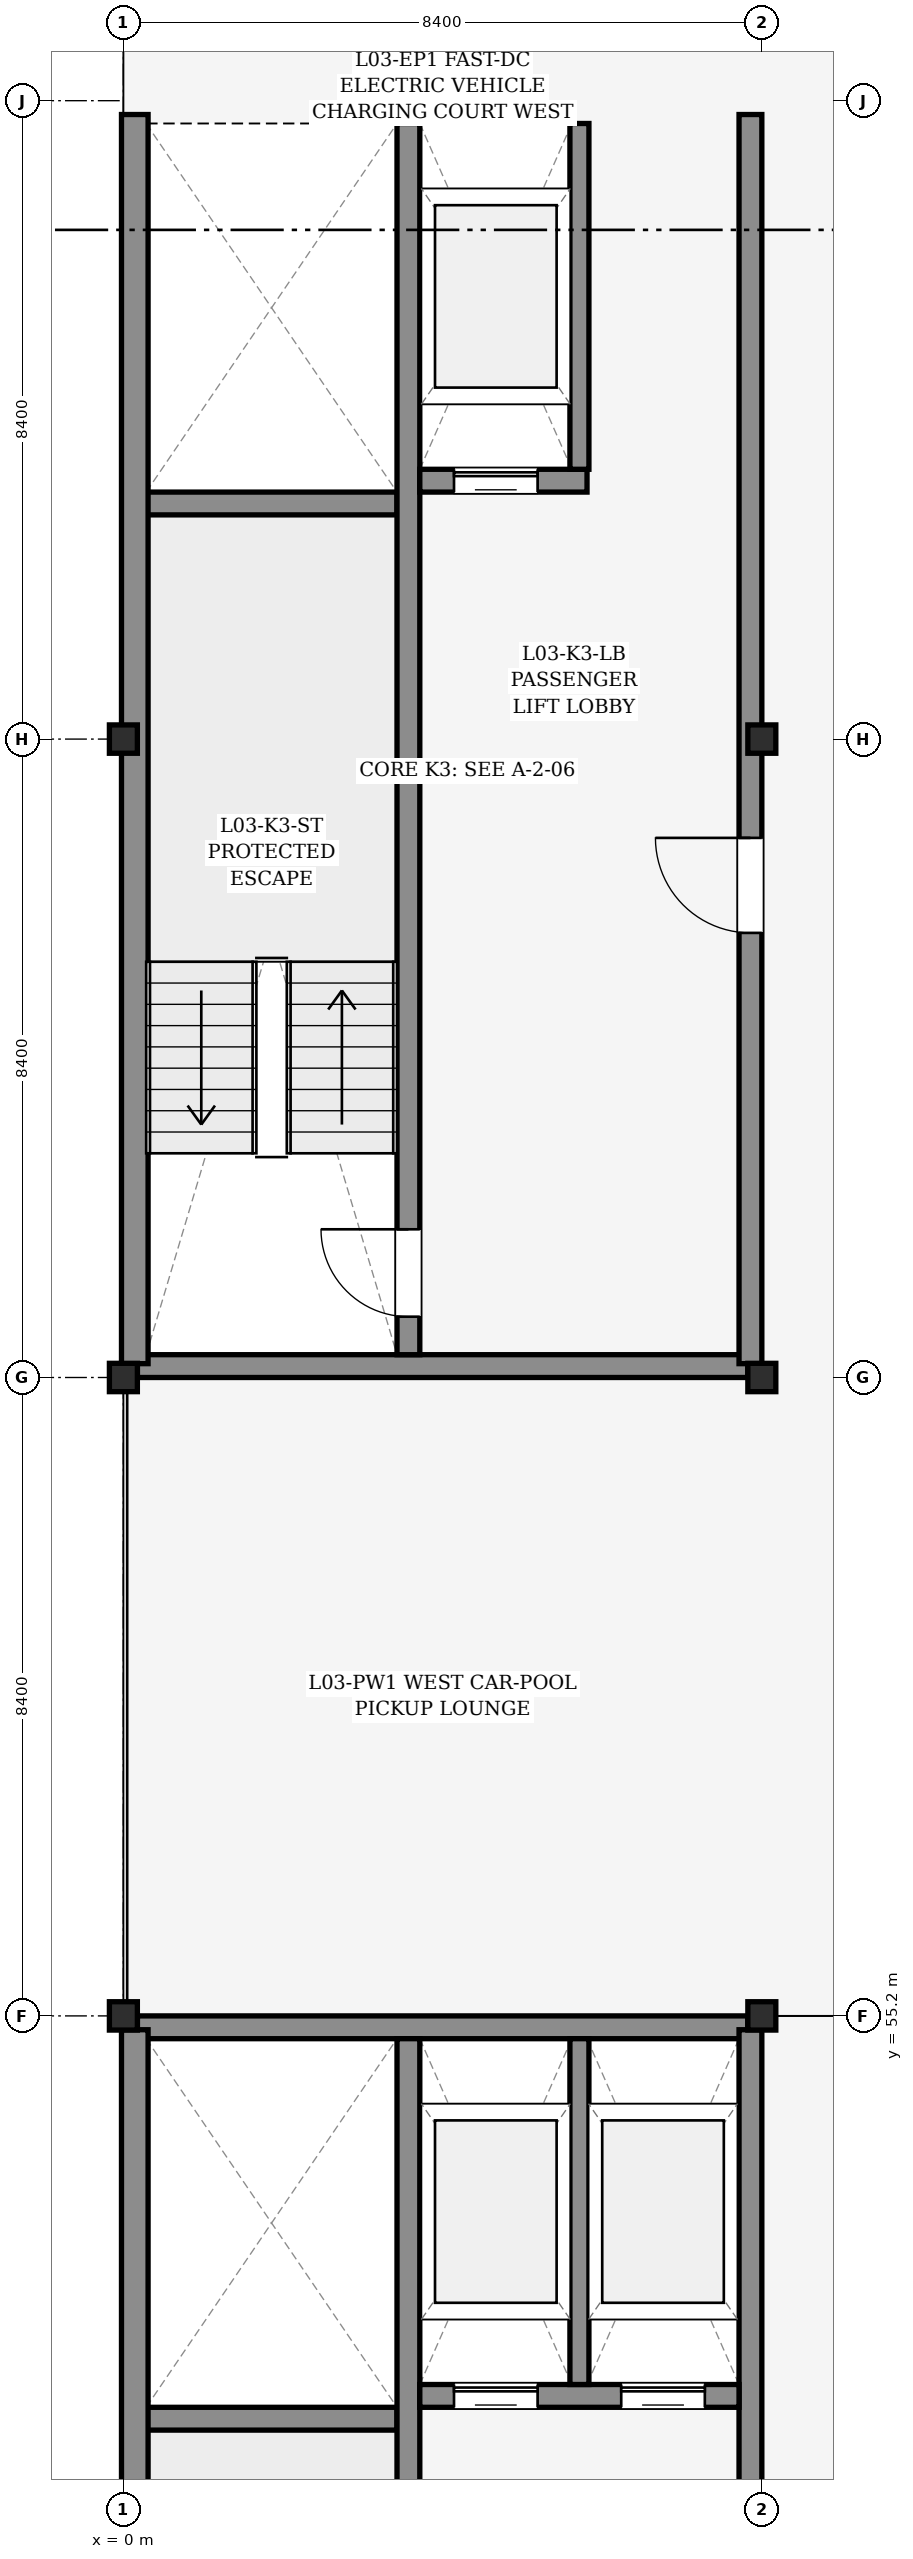
"""IFC4 building model, lengths in metres.
Left out: names, types, materials, properties, quantities, classifications, styles, units other than length and angle.
Written with IfcOpenShell. Run it as: python <this file> out.ifc"""

import sys

from ifc_helpers import new_model, si_unit, direction, frame, frame_2d, origin, origin_2d, place, context, subcontext, project, spatial, rectangle, i_section, extrude, element, fill, save


model = new_model("IFC4")
c1 = context("Model", 3, precision=1e-05, world=origin(), true_north=direction((0.0, 1.0)))
c2 = subcontext(c1, "Body", "Model", "MODEL_VIEW")
j1 = project(units=[si_unit("LENGTHUNIT", "METRE"), si_unit("PLANEANGLEUNIT", "RADIAN")], contexts=[c1])
p1 = place(None, origin())
s1 = spatial("IfcSite", under=j1, at=p1, CompositionType="ELEMENT")
p2 = place(p1, origin())
s2 = spatial("IfcBuilding", under=s1, at=p2, CompositionType="ELEMENT")
p3 = place(p2, frame((0.0, 0.0, 12.6)))
s3 = spatial("IfcBuildingStorey", under=s2, at=p3, CompositionType="ELEMENT", Elevation=12.6)
for number, where, z_axis, x_axis in (
    (1, (0.0, 55.2, 0.0), (0.0, 0.0, 1.0), (1.0, 0.0, 0.0)),
    (2, (0.0, 63.6, 0.0), (0.0, 0.0, 1.0), (1.0, 0.0, 0.0)),
    (3, (0.0, 72.0, 0.0), (0.0, 0.0, 1.0), (1.0, 0.0, 0.0)),
    (4, (0.0, 80.4, 0.0), (0.0, 0.0, 1.0), (1.0, 0.0, 0.0)),
    (5, (8.4, 55.2, 0.0), (0.0, 0.0, 1.0), (1.0, 0.0, 0.0)),
    (6, (8.4, 63.6, 0.0), (0.0, 0.0, 1.0), (1.0, 0.0, 0.0)),
    (7, (8.4, 72.0, 0.0), (0.0, 0.0, 1.0), (1.0, 0.0, 0.0)),
    (8, (8.4, 80.4, 0.0), (0.0, 0.0, 1.0), (1.0, 0.0, 0.0)),
):
    element("IfcColumn", number, at=place(p3, frame(where, z_axis=z_axis, x_axis=x_axis)), inside=s3, PredefinedType="COLUMN", context=c2, shape_type="SweptSolid", body=[
        extrude(i_section(OverallWidth=0.373, OverallDepth=0.368, WebThickness=0.014, FlangeThickness=0.024, FilletRadius=0.015, at=origin_2d()), origin(), (0.0, 0.0, 1.0), 3.6),
    ])
p4 = place(p3, frame((0.185, 55.05, 0.0), z_axis=(0.0, 0.0, 1.0), x_axis=(1.0, 0.0, 0.0)))
e9 = element("IfcWall", 9, at=p4, inside=s3, PredefinedType="SHEAR", context=c2, shape_type="SweptSolid", body=[
    extrude(rectangle(XDim=8.031, YDim=0.3, at=frame_2d((4.016, 0.0))), origin(), (0.0, 0.0, 1.0), 3.38),
])
p5 = place(p3, frame((0.3, 49.9, 0.0), z_axis=(0.0, 0.0, 1.0), x_axis=(1.0, 0.0, 0.0)))
e10 = element("IfcWall", 10, at=p5, inside=s3, PredefinedType="SHEAR", context=c2, shape_type="SweptSolid", body=[
    extrude(rectangle(XDim=3.3, YDim=0.3, at=frame_2d((1.65, 0.0))), origin(), (0.0, 0.0, 1.0), 3.38),
])
p6 = place(p3, frame((0.15, 38.582, 0.0), z_axis=(0.0, 0.0, 1.0), x_axis=(0.0, 1.0, 0.0)))
e11 = element("IfcWall", 11, at=p6, inside=s3, PredefinedType="SHEAR", context=c2, shape_type="SweptSolid", body=[
    extrude(rectangle(XDim=16.436, YDim=0.35, at=frame_2d((8.218, 0.0))), origin(), (0.0, 0.0, 1.0), 3.38),
])
p7 = place(p3, frame((8.25, 38.582, 0.0), z_axis=(0.0, 0.0, 1.0), x_axis=(0.0, 1.0, 0.0)))
e12 = element("IfcWall", 12, at=p7, inside=s3, PredefinedType="SHEAR", context=c2, shape_type="SweptSolid", body=[
    extrude(rectangle(XDim=16.436, YDim=0.3, at=frame_2d((8.218, 0.0))), origin(), (0.0, 0.0, 1.0), 3.38),
])
p8 = place(p7, frame((5.668, 0.0, 0.0)))
e13 = element("IfcOpeningElement", 13, at=p8, cuts=e12, PredefinedType="OPENING", context=c2, shape_type="SweptSolid", body=[
    extrude(rectangle(XDim=1.3, YDim=2.2, at=frame_2d((0.65, 1.1))), frame((0.0, 0.16, 0.0), z_axis=(0.0, -1.0, 0.0), x_axis=(1.0, 0.0, 0.0)), (0.0, 0.0, 1.0), 0.32),
])
p9 = place(p3, frame((3.75, 38.7, 0.0), z_axis=(0.0, 0.0, 1.0), x_axis=(0.0, 1.0, 0.0)))
e14 = element("IfcWall", 14, at=p9, inside=s3, PredefinedType="SHEAR", context=c2, shape_type="SweptSolid", body=[
    extrude(rectangle(XDim=16.2, YDim=0.3, at=frame_2d((8.1, 0.0))), origin(), (0.0, 0.0, 1.0), 3.38),
])
p10 = place(p9, frame((0.5, 0.0, 0.0)))
e15 = element("IfcOpeningElement", 15, at=p10, cuts=e14, PredefinedType="OPENING", context=c2, shape_type="SweptSolid", body=[
    extrude(rectangle(XDim=1.15, YDim=2.15, at=frame_2d((0.575, 1.075))), frame((0.0, 0.16, 0.0), z_axis=(0.0, -1.0, 0.0), x_axis=(1.0, 0.0, 0.0)), (0.0, 0.0, 1.0), 0.32),
])
p11 = place(p3, frame((3.9, 50.2, 0.0), z_axis=(0.0, 0.0, 1.0), x_axis=(1.0, 0.0, 0.0)))
e16 = element("IfcWall", 16, at=p11, inside=s3, PredefinedType="SHEAR", context=c2, shape_type="SweptSolid", body=[
    extrude(rectangle(XDim=4.2, YDim=0.3, at=frame_2d((2.1, 0.0))), origin(), (0.0, 0.0, 1.0), 3.38),
])
p12 = place(p11, frame((0.45, 0.0, 0.0)))
e17 = element("IfcOpeningElement", 17, at=p12, cuts=e16, PredefinedType="OPENING", context=c2, shape_type="SweptSolid", body=[
    extrude(rectangle(XDim=1.1, YDim=2.2, at=frame_2d((0.55, 1.1))), frame((0.0, 0.16, 0.0), z_axis=(0.0, -1.0, 0.0), x_axis=(1.0, 0.0, 0.0)), (0.0, 0.0, 1.0), 0.32),
])
p13 = place(p11, frame((2.65, 0.0, 0.0)))
e18 = element("IfcOpeningElement", 18, at=p13, cuts=e16, PredefinedType="OPENING", context=c2, shape_type="SweptSolid", body=[
    extrude(rectangle(XDim=1.1, YDim=2.2, at=frame_2d((0.55, 1.1))), frame((0.0, 0.16, 0.0), z_axis=(0.0, -1.0, 0.0), x_axis=(1.0, 0.0, 0.0)), (0.0, 0.0, 1.0), 0.32),
])
p14 = place(p3, frame((6.0, 50.35, 0.0), z_axis=(0.0, 0.0, 1.0), x_axis=(0.0, 1.0, 0.0)))
e19 = element("IfcWall", 19, at=p14, inside=s3, PredefinedType="PARTITIONING", context=c2, shape_type="SweptSolid", body=[
    extrude(rectangle(XDim=4.55, YDim=0.25, at=frame_2d((2.275, 0.0))), origin(), (0.0, 0.0, 1.0), 2.525),
])
for number, where, z_axis, x_axis in (
    (20, (0.185, 63.75, 0.0), (0.0, 0.0, 1.0), (1.0, 0.0, 0.0)),
    (21, (0.185, 80.25, 0.0), (0.0, 0.0, 1.0), (1.0, 0.0, 0.0)),
):
    element("IfcWall", number, at=place(p3, frame(where, z_axis=z_axis, x_axis=x_axis)), inside=s3, PredefinedType="SHEAR", context=c2, shape_type="SweptSolid", body=[
        extrude(rectangle(XDim=8.031, YDim=0.3, at=frame_2d((4.016, 0.0))), origin(), (0.0, 0.0, 1.0), 3.38),
    ])
p15 = place(p3, frame((0.3, 75.1, 0.0), z_axis=(0.0, 0.0, 1.0), x_axis=(1.0, 0.0, 0.0)))
e22 = element("IfcWall", 22, at=p15, inside=s3, PredefinedType="SHEAR", context=c2, shape_type="SweptSolid", body=[
    extrude(rectangle(XDim=3.3, YDim=0.3, at=frame_2d((1.65, 0.0))), origin(), (0.0, 0.0, 1.0), 3.38),
])
p16 = place(p3, frame((0.15, 63.782, 0.0), z_axis=(0.0, 0.0, 1.0), x_axis=(0.0, 1.0, 0.0)))
e23 = element("IfcWall", 23, at=p16, inside=s3, PredefinedType="SHEAR", context=c2, shape_type="SweptSolid", body=[
    extrude(rectangle(XDim=16.436, YDim=0.35, at=frame_2d((8.218, 0.0))), origin(), (0.0, 0.0, 1.0), 3.38),
])
p17 = place(p3, frame((8.25, 63.782, 0.0), z_axis=(0.0, 0.0, 1.0), x_axis=(0.0, 1.0, 0.0)))
e24 = element("IfcWall", 24, at=p17, inside=s3, PredefinedType="SHEAR", context=c2, shape_type="SweptSolid", body=[
    extrude(rectangle(XDim=16.436, YDim=0.3, at=frame_2d((8.218, 0.0))), origin(), (0.0, 0.0, 1.0), 3.38),
])
p18 = place(p17, frame((5.668, 0.0, 0.0)))
e25 = element("IfcOpeningElement", 25, at=p18, cuts=e24, PredefinedType="OPENING", context=c2, shape_type="SweptSolid", body=[
    extrude(rectangle(XDim=1.25, YDim=2.15, at=frame_2d((0.625, 1.075))), frame((0.0, 0.16, 0.0), z_axis=(0.0, -1.0, 0.0), x_axis=(1.0, 0.0, 0.0)), (0.0, 0.0, 1.0), 0.32),
])
p19 = place(p3, frame((3.75, 63.9, 0.0), z_axis=(0.0, 0.0, 1.0), x_axis=(0.0, 1.0, 0.0)))
e26 = element("IfcWall", 26, at=p19, inside=s3, PredefinedType="SHEAR", context=c2, shape_type="SweptSolid", body=[
    extrude(rectangle(XDim=16.2, YDim=0.3, at=frame_2d((8.1, 0.0))), origin(), (0.0, 0.0, 1.0), 3.38),
])
p20 = place(p19, frame((0.5, 0.0, 0.0)))
e27 = element("IfcOpeningElement", 27, at=p20, cuts=e26, PredefinedType="OPENING", context=c2, shape_type="SweptSolid", body=[
    extrude(rectangle(XDim=1.15, YDim=2.15, at=frame_2d((0.575, 1.075))), frame((0.0, 0.16, 0.0), z_axis=(0.0, -1.0, 0.0), x_axis=(1.0, 0.0, 0.0)), (0.0, 0.0, 1.0), 0.32),
])
p21 = place(p3, frame((3.9, 75.4, 0.0), z_axis=(0.0, 0.0, 1.0), x_axis=(1.0, 0.0, 0.0)))
e28 = element("IfcWall", 28, at=p21, inside=s3, PredefinedType="SHEAR", context=c2, shape_type="SweptSolid", body=[
    extrude(rectangle(XDim=2.2, YDim=0.3, at=frame_2d((1.1, 0.0))), origin(), (0.0, 0.0, 1.0), 3.38),
])
p22 = place(p21, frame((0.45, 0.0, 0.0)))
e29 = element("IfcOpeningElement", 29, at=p22, cuts=e28, PredefinedType="OPENING", context=c2, shape_type="SweptSolid", body=[
    extrude(rectangle(XDim=1.1, YDim=2.2, at=frame_2d((0.55, 1.1))), frame((0.0, 0.16, 0.0), z_axis=(0.0, -1.0, 0.0), x_axis=(1.0, 0.0, 0.0)), (0.0, 0.0, 1.0), 0.32),
])
p23 = place(p3, frame((6.0, 75.55, 0.0), z_axis=(0.0, 0.0, 1.0), x_axis=(0.0, 1.0, 0.0)))
e30 = element("IfcWall", 30, at=p23, inside=s3, PredefinedType="PARTITIONING", context=c2, shape_type="SweptSolid", body=[
    extrude(rectangle(XDim=4.55, YDim=0.25, at=frame_2d((2.275, 0.0))), origin(), (0.0, 0.0, 1.0), 2.525),
])
p24 = place(p12, origin())
e31 = element("IfcDoor", 31, at=p24, inside=s3, OperationType="SLIDING_TO_LEFT", PredefinedType="DOOR", context=c2, shape_type="SweptSolid", body=[
    extrude(rectangle(XDim=1.1, YDim=2.2, at=frame_2d((0.55, 1.1))), frame((0.0, 0.025, 0.0), z_axis=(0.0, -1.0, 0.0), x_axis=(1.0, 0.0, 0.0)), (0.0, 0.0, 1.0), 0.05),
])
fill(e17, e31)
p25 = place(p13, origin())
e32 = element("IfcDoor", 32, at=p25, inside=s3, OperationType="SLIDING_TO_LEFT", PredefinedType="DOOR", context=c2, shape_type="SweptSolid", body=[
    extrude(rectangle(XDim=1.1, YDim=2.2, at=frame_2d((0.55, 1.1))), frame((0.0, 0.025, 0.0), z_axis=(0.0, -1.0, 0.0), x_axis=(1.0, 0.0, 0.0)), (0.0, 0.0, 1.0), 0.05),
])
fill(e18, e32)
p26 = place(p18, origin())
e33 = element("IfcDoor", 33, at=p26, inside=s3, OperationType="SINGLE_SWING_RIGHT", PredefinedType="DOOR", context=c2, shape_type="SweptSolid", body=[
    extrude(rectangle(XDim=1.25, YDim=2.15, at=frame_2d((0.625, 1.075))), frame((0.0, 0.025, 0.0), z_axis=(0.0, -1.0, 0.0), x_axis=(1.0, 0.0, 0.0)), (0.0, 0.0, 1.0), 0.05),
])
fill(e25, e33)
p27 = place(p20, frame((1.15, 0.0, 0.0), z_axis=(0.0, 0.0, 1.0), x_axis=(-1.0, 0.0, 0.0)))
e34 = element("IfcDoor", 34, at=p27, inside=s3, OperationType="SINGLE_SWING_LEFT", PredefinedType="DOOR", context=c2, shape_type="SweptSolid", body=[
    extrude(rectangle(XDim=1.15, YDim=2.15, at=frame_2d((0.575, 1.075))), frame((0.0, 0.025, 0.0), z_axis=(0.0, -1.0, 0.0), x_axis=(1.0, 0.0, 0.0)), (0.0, 0.0, 1.0), 0.05),
])
fill(e27, e34)
p28 = place(p22, origin())
e35 = element("IfcDoor", 35, at=p28, inside=s3, OperationType="SLIDING_TO_LEFT", PredefinedType="DOOR", context=c2, shape_type="SweptSolid", body=[
    extrude(rectangle(XDim=1.1, YDim=2.2, at=frame_2d((0.55, 1.1))), frame((0.0, 0.025, 0.0), z_axis=(0.0, -1.0, 0.0), x_axis=(1.0, 0.0, 0.0)), (0.0, 0.0, 1.0), 0.05),
])
fill(e29, e35)
save(model, sys.argv[1])
